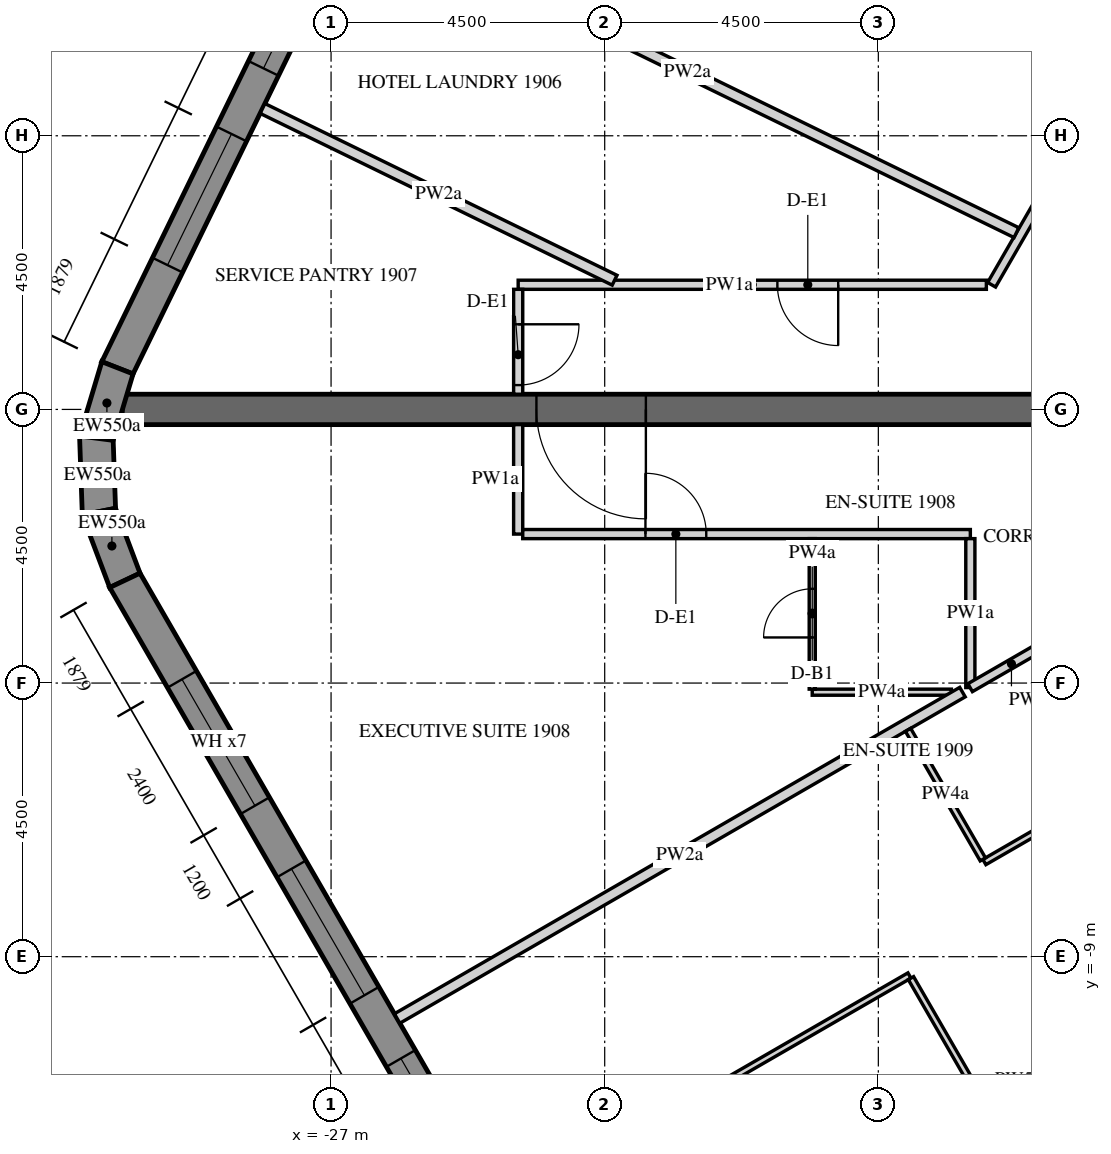
"""IFC4 building model, lengths in metres.
Left out: names, types, materials, properties, quantities, classifications, styles, units other than length and angle.
Written with IfcOpenShell. Run it as: python <this file> out.ifc"""

import sys

from ifc_helpers import new_model, si_unit, direction, frame, frame_2d, origin, place, context, subcontext, project, spatial, polyline, rectangle, outline, extrude, element, fill, save


model = new_model("IFC4")
c1 = context("Model", 3, precision=1e-05, world=origin(), true_north=direction((0.0, 1.0)))
c2 = subcontext(c1, "Body", "Model", "MODEL_VIEW")
j1 = project(units=[si_unit("LENGTHUNIT", "METRE"), si_unit("PLANEANGLEUNIT", "RADIAN")], contexts=[c1])
p1 = place(None, origin())
s1 = spatial("IfcSite", under=j1, at=p1, CompositionType="ELEMENT")
p2 = place(p1, origin())
s2 = spatial("IfcBuilding", under=s1, at=p2, CompositionType="ELEMENT")
p3 = place(p2, frame((0.0, 0.0, 246.3)))
s3 = spatial("IfcBuildingStorey", under=s2, at=p3, CompositionType="ELEMENT", Elevation=246.3)
p4 = place(p3, frame((-18.345, 25.633, -0.15), z_axis=(0.0, 0.0, 1.0), x_axis=(-0.43837181828, -0.898793718791, 0.0)))
e1 = element("IfcWall", 1, at=p4, inside=s3, PredefinedType="SOLIDWALL", context=c2, shape_type="SweptSolid", body=[
    extrude(outline(polyline([(-0.026, -0.275), (27.78, -0.275), (27.735, 0.275), (0.026, 0.275), (-0.026, -0.275)])), origin(), (0.0, 0.0, 1.0), 3.75),
])
p5 = place(p4, frame((1.879, 0.0, 1.05)))
e2 = element("IfcOpeningElement", 2, at=p5, cuts=e1, PredefinedType="OPENING", context=c2, shape_type="SweptSolid", body=[
    extrude(rectangle(XDim=2.4, YDim=2.4, at=frame_2d((1.2, 1.2))), frame((0.0, 0.285, 0.0), z_axis=(0.0, -1.0, 0.0), x_axis=(1.0, 0.0, 0.0)), (0.0, 0.0, 1.0), 0.57),
])
p6 = place(p4, frame((5.479, 0.0, 1.05)))
e3 = element("IfcOpeningElement", 3, at=p6, cuts=e1, PredefinedType="OPENING", context=c2, shape_type="SweptSolid", body=[
    extrude(rectangle(XDim=2.4, YDim=2.4, at=frame_2d((1.2, 1.2))), frame((0.0, 0.285, 0.0), z_axis=(0.0, -1.0, 0.0), x_axis=(1.0, 0.0, 0.0)), (0.0, 0.0, 1.0), 0.57),
])
p7 = place(p4, frame((9.079, 0.0, 1.05)))
e4 = element("IfcOpeningElement", 4, at=p7, cuts=e1, PredefinedType="OPENING", context=c2, shape_type="SweptSolid", body=[
    extrude(rectangle(XDim=2.4, YDim=2.4, at=frame_2d((1.2, 1.2))), frame((0.0, 0.285, 0.0), z_axis=(0.0, -1.0, 0.0), x_axis=(1.0, 0.0, 0.0)), (0.0, 0.0, 1.0), 0.57),
])
p8 = place(p4, frame((12.679, 0.0, 1.05)))
e5 = element("IfcOpeningElement", 5, at=p8, cuts=e1, PredefinedType="OPENING", context=c2, shape_type="SweptSolid", body=[
    extrude(rectangle(XDim=2.4, YDim=2.4, at=frame_2d((1.2, 1.2))), frame((0.0, 0.285, 0.0), z_axis=(0.0, -1.0, 0.0), x_axis=(1.0, 0.0, 0.0)), (0.0, 0.0, 1.0), 0.57),
])
p9 = place(p4, frame((16.279, 0.0, 1.05)))
e6 = element("IfcOpeningElement", 6, at=p9, cuts=e1, PredefinedType="OPENING", context=c2, shape_type="SweptSolid", body=[
    extrude(rectangle(XDim=2.4, YDim=2.4, at=frame_2d((1.2, 1.2))), frame((0.0, 0.285, 0.0), z_axis=(0.0, -1.0, 0.0), x_axis=(1.0, 0.0, 0.0)), (0.0, 0.0, 1.0), 0.57),
])
p10 = place(p4, frame((19.879, 0.0, 1.05)))
e7 = element("IfcOpeningElement", 7, at=p10, cuts=e1, PredefinedType="OPENING", context=c2, shape_type="SweptSolid", body=[
    extrude(rectangle(XDim=2.4, YDim=2.4, at=frame_2d((1.2, 1.2))), frame((0.0, 0.285, 0.0), z_axis=(0.0, -1.0, 0.0), x_axis=(1.0, 0.0, 0.0)), (0.0, 0.0, 1.0), 0.57),
])
p11 = place(p4, frame((23.479, 0.0, 1.05)))
e8 = element("IfcOpeningElement", 8, at=p11, cuts=e1, PredefinedType="OPENING", context=c2, shape_type="SweptSolid", body=[
    extrude(rectangle(XDim=2.4, YDim=2.4, at=frame_2d((1.2, 1.2))), frame((0.0, 0.285, 0.0), z_axis=(0.0, -1.0, 0.0), x_axis=(1.0, 0.0, 0.0)), (0.0, 0.0, 1.0), 0.57),
])
p12 = place(p3, frame((-30.513, 0.684, -0.15), z_axis=(0.0, 0.0, 1.0), x_axis=(-0.286736058109, -0.958009620505, 0.0)))
e9 = element("IfcWall", 9, at=p12, inside=s3, PredefinedType="SOLIDWALL", context=c2, shape_type="SweptSolid", body=[
    extrude(outline(polyline([(-0.022, -0.275), (1.253, -0.275), (1.163, 0.275), (0.022, 0.275), (-0.022, -0.275)])), origin(), (0.0, 0.0, 1.0), 3.75),
])
p13 = place(p3, frame((-30.86, -0.473, -0.15), z_axis=(0.0, 0.0, 1.0), x_axis=(0.03495638276, -0.999388838893, 0.0)))
e10 = element("IfcWall", 10, at=p13, inside=s3, PredefinedType="SOLIDWALL", context=c2, shape_type="SweptSolid", body=[
    extrude(outline(polyline([(-0.045, -0.275), (1.253, -0.275), (1.163, 0.275), (0.045, 0.275), (-0.045, -0.275)])), origin(), (0.0, 0.0, 1.0), 3.75),
])
p14 = place(p3, frame((-30.817, -1.681, -0.15), z_axis=(0.0, 0.0, 1.0), x_axis=(0.352850303963, -0.935679786569, 0.0)))
e11 = element("IfcWall", 11, at=p14, inside=s3, PredefinedType="SOLIDWALL", context=c2, shape_type="SweptSolid", body=[
    extrude(outline(polyline([(-0.045, -0.275), (1.23, -0.275), (1.186, 0.275), (0.045, 0.275), (-0.045, -0.275)])), origin(), (0.0, 0.0, 1.0), 3.75),
])
p15 = place(p3, frame((-30.391, -2.811, -0.15), z_axis=(0.0, 0.0, 1.0), x_axis=(0.499998569178, -0.866026229868, 0.0)))
e12 = element("IfcWall", 12, at=p15, inside=s3, PredefinedType="SOLIDWALL", context=c2, shape_type="SweptSolid", body=[
    extrude(outline(polyline([(-0.022, -0.275), (27.783, -0.275), (27.732, 0.275), (0.022, 0.275), (-0.022, -0.275)])), origin(), (0.0, 0.0, 1.0), 3.75),
])
p16 = place(p15, frame((1.879, 0.0, 1.05)))
e13 = element("IfcOpeningElement", 13, at=p16, cuts=e12, PredefinedType="OPENING", context=c2, shape_type="SweptSolid", body=[
    extrude(rectangle(XDim=2.4, YDim=2.4, at=frame_2d((1.2, 1.2))), frame((0.0, 0.285, 0.0), z_axis=(0.0, -1.0, 0.0), x_axis=(1.0, 0.0, 0.0)), (0.0, 0.0, 1.0), 0.57),
])
p17 = place(p15, frame((5.479, 0.0, 1.05)))
e14 = element("IfcOpeningElement", 14, at=p17, cuts=e12, PredefinedType="OPENING", context=c2, shape_type="SweptSolid", body=[
    extrude(rectangle(XDim=2.4, YDim=2.4, at=frame_2d((1.2, 1.2))), frame((0.0, 0.285, 0.0), z_axis=(0.0, -1.0, 0.0), x_axis=(1.0, 0.0, 0.0)), (0.0, 0.0, 1.0), 0.57),
])
p18 = place(p15, frame((9.079, 0.0, 1.05)))
e15 = element("IfcOpeningElement", 15, at=p18, cuts=e12, PredefinedType="OPENING", context=c2, shape_type="SweptSolid", body=[
    extrude(rectangle(XDim=2.4, YDim=2.4, at=frame_2d((1.2, 1.2))), frame((0.0, 0.285, 0.0), z_axis=(0.0, -1.0, 0.0), x_axis=(1.0, 0.0, 0.0)), (0.0, 0.0, 1.0), 0.57),
])
p19 = place(p15, frame((12.679, 0.0, 1.05)))
e16 = element("IfcOpeningElement", 16, at=p19, cuts=e12, PredefinedType="OPENING", context=c2, shape_type="SweptSolid", body=[
    extrude(rectangle(XDim=2.4, YDim=2.4, at=frame_2d((1.2, 1.2))), frame((0.0, 0.285, 0.0), z_axis=(0.0, -1.0, 0.0), x_axis=(1.0, 0.0, 0.0)), (0.0, 0.0, 1.0), 0.57),
])
p20 = place(p15, frame((16.279, 0.0, 1.05)))
e17 = element("IfcOpeningElement", 17, at=p20, cuts=e12, PredefinedType="OPENING", context=c2, shape_type="SweptSolid", body=[
    extrude(rectangle(XDim=2.4, YDim=2.4, at=frame_2d((1.2, 1.2))), frame((0.0, 0.285, 0.0), z_axis=(0.0, -1.0, 0.0), x_axis=(1.0, 0.0, 0.0)), (0.0, 0.0, 1.0), 0.57),
])
p21 = place(p15, frame((19.879, 0.0, 1.05)))
e18 = element("IfcOpeningElement", 18, at=p21, cuts=e12, PredefinedType="OPENING", context=c2, shape_type="SweptSolid", body=[
    extrude(rectangle(XDim=2.4, YDim=2.4, at=frame_2d((1.2, 1.2))), frame((0.0, 0.285, 0.0), z_axis=(0.0, -1.0, 0.0), x_axis=(1.0, 0.0, 0.0)), (0.0, 0.0, 1.0), 0.57),
])
p22 = place(p15, frame((23.479, 0.0, 1.05)))
e19 = element("IfcOpeningElement", 19, at=p22, cuts=e12, PredefinedType="OPENING", context=c2, shape_type="SweptSolid", body=[
    extrude(rectangle(XDim=2.4, YDim=2.4, at=frame_2d((1.2, 1.2))), frame((0.0, 0.285, 0.0), z_axis=(0.0, -1.0, 0.0), x_axis=(1.0, 0.0, 0.0)), (0.0, 0.0, 1.0), 0.57),
])
p23 = place(p3, frame((-15.011, 0.0, -0.15), z_axis=(0.0, 0.0, 1.0), x_axis=(-1.0, 0.0, 0.0)))
e20 = element("IfcWall", 20, at=p23, inside=s3, PredefinedType="SHEAR", context=c2, shape_type="SweptSolid", body=[
    extrude(rectangle(XDim=15.424, YDim=0.5, at=frame_2d((7.712, 0.0))), origin(), (0.0, 0.0, 1.0), 3.75),
])
p24 = place(p23, frame((6.812, 0.0, 0.15)))
e21 = element("IfcOpeningElement", 21, at=p24, cuts=e20, PredefinedType="OPENING", context=c2, shape_type="SweptSolid", body=[
    extrude(rectangle(XDim=1.8, YDim=2.4, at=frame_2d((0.9, 1.2))), frame((0.0, 0.26, 0.0), z_axis=(0.0, -1.0, 0.0), x_axis=(1.0, 0.0, 0.0)), (0.0, 0.0, 1.0), 0.52),
])
p25 = place(p3, frame((-8.673, 14.978, 0.0), z_axis=(0.0, 0.0, 1.0), x_axis=(-0.50000700621, -0.86602135871, 0.0)))
e22 = element("IfcWall", 22, at=p25, inside=s3, PredefinedType="PARTITIONING", context=c2, shape_type="SweptSolid", body=[
    extrude(rectangle(XDim=14.928, YDim=0.15, at=frame_2d((7.464, 0.0))), origin(), (0.0, 0.0, 1.0), 2.838),
])
p26 = place(p25, frame((4.454, 0.0, 0.0)))
e23 = element("IfcOpeningElement", 23, at=p26, cuts=e22, PredefinedType="OPENING", context=c2, shape_type="SweptSolid", body=[
    extrude(rectangle(XDim=1.0, YDim=2.1, at=frame_2d((0.5, 1.05))), frame((0.0, 0.085, 0.0), z_axis=(0.0, -1.0, 0.0), x_axis=(1.0, 0.0, 0.0)), (0.0, 0.0, 1.0), 0.17),
])
p27 = place(p25, frame((11.264, 0.0, 0.0)))
e24 = element("IfcOpeningElement", 24, at=p27, cuts=e22, PredefinedType="OPENING", context=c2, shape_type="SweptSolid", body=[
    extrude(rectangle(XDim=1.0, YDim=2.1, at=frame_2d((0.5, 1.05))), frame((0.0, 0.085, 0.0), z_axis=(0.0, -1.0, 0.0), x_axis=(1.0, 0.0, 0.0)), (0.0, 0.0, 1.0), 0.17),
])
p28 = place(p3, frame((-16.224, 2.05, 0.0), z_axis=(0.0, 0.0, 1.0), x_axis=(-1.0, 0.0, 0.0)))
e25 = element("IfcWall", 25, at=p28, inside=s3, PredefinedType="PARTITIONING", context=c2, shape_type="SweptSolid", body=[
    extrude(rectangle(XDim=7.699, YDim=0.15, at=frame_2d((3.85, 0.0))), origin(), (0.0, 0.0, 1.0), 2.838),
])
p29 = place(p28, frame((2.437, 0.0, 0.0)))
e26 = element("IfcOpeningElement", 26, at=p29, cuts=e25, PredefinedType="OPENING", context=c2, shape_type="SweptSolid", body=[
    extrude(rectangle(XDim=1.0, YDim=2.1, at=frame_2d((0.5, 1.05))), frame((0.0, 0.085, 0.0), z_axis=(0.0, -1.0, 0.0), x_axis=(1.0, 0.0, 0.0)), (0.0, 0.0, 1.0), 0.17),
])
p30 = place(p3, frame((-23.923, 1.975, 0.0), z_axis=(0.0, 0.0, 1.0), x_axis=(0.0, -1.0, 0.0)))
e27 = element("IfcWall", 27, at=p30, inside=s3, PredefinedType="PARTITIONING", context=c2, shape_type="SweptSolid", body=[
    extrude(rectangle(XDim=1.725, YDim=0.15, at=frame_2d((0.863, 0.0))), origin(), (0.0, 0.0, 1.0), 2.838),
])
p31 = place(p30, frame((0.575, 0.0, 0.0)))
e28 = element("IfcOpeningElement", 28, at=p31, cuts=e27, PredefinedType="OPENING", context=c2, shape_type="SweptSolid", body=[
    extrude(rectangle(XDim=1.0, YDim=2.1, at=frame_2d((0.5, 1.05))), frame((0.0, 0.085, 0.0), z_axis=(0.0, -1.0, 0.0), x_axis=(1.0, 0.0, 0.0)), (0.0, 0.0, 1.0), 0.17),
])
p32 = place(p3, frame((-23.923, -0.25, 0.0), z_axis=(0.0, 0.0, 1.0), x_axis=(0.0, -1.0, 0.0)))
e29 = element("IfcWall", 29, at=p32, inside=s3, PredefinedType="PARTITIONING", context=c2, shape_type="SweptSolid", body=[
    extrude(rectangle(XDim=1.8, YDim=0.15, at=frame_2d((0.9, 0.0))), origin(), (0.0, 0.0, 1.0), 2.838),
])
p33 = place(p3, frame((-23.848, -2.05, 0.0), z_axis=(0.0, 0.0, 1.0), x_axis=(1.0, 0.0, 0.0)))
e30 = element("IfcWall", 30, at=p33, inside=s3, PredefinedType="PARTITIONING", context=c2, shape_type="SweptSolid", body=[
    extrude(rectangle(XDim=7.361, YDim=0.15, at=frame_2d((3.68, 0.0))), origin(), (0.0, 0.0, 1.0), 2.838),
])
p34 = place(p33, frame((2.018, 0.0, 0.0)))
e31 = element("IfcOpeningElement", 31, at=p34, cuts=e30, PredefinedType="OPENING", context=c2, shape_type="SweptSolid", body=[
    extrude(rectangle(XDim=1.0, YDim=2.1, at=frame_2d((0.5, 1.05))), frame((0.0, 0.085, 0.0), z_axis=(0.0, -1.0, 0.0), x_axis=(1.0, 0.0, 0.0)), (0.0, 0.0, 1.0), 0.17),
])
p35 = place(p3, frame((-16.487, -2.125, 0.0), z_axis=(0.0, 0.0, 1.0), x_axis=(0.0, -1.0, 0.0)))
e32 = element("IfcWall", 32, at=p35, inside=s3, PredefinedType="PARTITIONING", context=c2, shape_type="SweptSolid", body=[
    extrude(rectangle(XDim=2.449, YDim=0.15, at=frame_2d((1.225, 0.0))), origin(), (0.0, 0.0, 1.0), 2.838),
])
p36 = place(p3, frame((-16.49, -4.576, 0.0), z_axis=(0.0, 0.0, 1.0), x_axis=(0.865993845424, 0.5000546567, 0.0)))
e33 = element("IfcWall", 33, at=p36, inside=s3, PredefinedType="PARTITIONING", context=c2, shape_type="SweptSolid", body=[
    extrude(rectangle(XDim=1.569, YDim=0.15, at=frame_2d((0.785, 0.0))), origin(), (0.0, 0.0, 1.0), 2.838),
])
p37 = place(p3, frame((-26.549, 8.185, 0.0), z_axis=(0.0, 0.0, 1.0), x_axis=(0.8987965099, -0.438366095623, 0.0)))
e34 = element("IfcWall", 34, at=p37, inside=s3, PredefinedType="PARTITIONING", context=c2, shape_type="SweptSolid", body=[
    extrude(rectangle(XDim=12.039, YDim=0.18, at=frame_2d((6.019, 0.0))), origin(), (0.0, 0.0, 1.0), 2.838),
])
p38 = place(p3, frame((-28.127, 4.949, 0.0), z_axis=(0.0, 0.0, 1.0), x_axis=(0.898795032868, -0.438369124017, 0.0)))
e35 = element("IfcWall", 35, at=p38, inside=s3, PredefinedType="PARTITIONING", context=c2, shape_type="SweptSolid", body=[
    extrude(rectangle(XDim=6.442, YDim=0.18, at=frame_2d((3.221, 0.0))), origin(), (0.0, 0.0, 1.0), 2.838),
])
p39 = place(p3, frame((-16.798, -4.65, 0.0), z_axis=(0.0, 0.0, 1.0), x_axis=(-1.0, 0.0, 0.0)))
e36 = element("IfcWall", 36, at=p39, inside=s3, PredefinedType="PARTITIONING", context=c2, shape_type="SweptSolid", body=[
    extrude(rectangle(XDim=2.289, YDim=0.1, at=frame_2d((1.144, 0.0))), origin(), (0.0, 0.0, 1.0), 2.838),
])
p40 = place(p3, frame((-19.087, -4.6, 0.0), z_axis=(0.0, 0.0, 1.0), x_axis=(0.0, 1.0, 0.0)))
e37 = element("IfcWall", 37, at=p40, inside=s3, PredefinedType="PARTITIONING", context=c2, shape_type="SweptSolid", body=[
    extrude(rectangle(XDim=2.475, YDim=0.1, at=frame_2d((1.238, 0.0))), origin(), (0.0, 0.0, 1.0), 2.838),
])
p41 = place(p40, frame((0.85, 0.0, 0.0)))
e38 = element("IfcOpeningElement", 38, at=p41, cuts=e37, PredefinedType="OPENING", context=c2, shape_type="SweptSolid", body=[
    extrude(rectangle(XDim=0.8, YDim=2.1, at=frame_2d((0.4, 1.05))), frame((0.0, 0.06, 0.0), z_axis=(0.0, -1.0, 0.0), x_axis=(1.0, 0.0, 0.0)), (0.0, 0.0, 1.0), 0.12),
])
p42 = place(p3, frame((-25.914, -10.017, 0.0), z_axis=(0.0, 0.0, 1.0), x_axis=(0.86602614826, 0.499998710529, 0.0)))
e39 = element("IfcWall", 39, at=p42, inside=s3, PredefinedType="PARTITIONING", context=c2, shape_type="SweptSolid", body=[
    extrude(rectangle(XDim=10.735, YDim=0.18, at=frame_2d((5.368, 0.0))), origin(), (0.0, 0.0, 1.0), 2.838),
])
p43 = place(p3, frame((-13.896, -6.081, 0.0), z_axis=(0.0, 0.0, 1.0), x_axis=(-0.866012511928, -0.500022328685, 0.0)))
e40 = element("IfcWall", 40, at=p43, inside=s3, PredefinedType="PARTITIONING", context=c2, shape_type="SweptSolid", body=[
    extrude(rectangle(XDim=2.725, YDim=0.1, at=frame_2d((1.363, 0.0))), origin(), (0.0, 0.0, 1.0), 2.838),
])
p44 = place(p43, frame((0.925, 0.0, 0.0)))
e41 = element("IfcOpeningElement", 41, at=p44, cuts=e40, PredefinedType="OPENING", context=c2, shape_type="SweptSolid", body=[
    extrude(rectangle(XDim=0.8, YDim=2.1, at=frame_2d((0.4, 1.05))), frame((0.0, 0.06, 0.0), z_axis=(0.0, -1.0, 0.0), x_axis=(1.0, 0.0, 0.0)), (0.0, 0.0, 1.0), 0.12),
])
p45 = place(p3, frame((-16.281, -7.4, 0.0), z_axis=(0.0, 0.0, 1.0), x_axis=(-0.500003092839, 0.866023618125, 0.0)))
e42 = element("IfcWall", 42, at=p45, inside=s3, PredefinedType="PARTITIONING", context=c2, shape_type="SweptSolid", body=[
    extrude(rectangle(XDim=2.46, YDim=0.1, at=frame_2d((1.23, 0.0))), origin(), (0.0, 0.0, 1.0), 2.838),
])
p46 = place(p3, frame((-24.114, -13.134, 0.0), z_axis=(0.0, 0.0, 1.0), x_axis=(0.866033062874, 0.499986733834, 0.0)))
e43 = element("IfcWall", 43, at=p46, inside=s3, PredefinedType="PARTITIONING", context=c2, shape_type="SweptSolid", body=[
    extrude(rectangle(XDim=7.65, YDim=0.1, at=frame_2d((3.825, 0.0))), origin(), (0.0, 0.0, 1.0), 2.838),
])
p47 = place(p3, frame((-17.463, -9.353, 0.0), z_axis=(0.0, 0.0, 1.0), x_axis=(0.499995846692, -0.866027801685, 0.0)))
e44 = element("IfcWall", 44, at=p47, inside=s3, PredefinedType="PARTITIONING", context=c2, shape_type="SweptSolid", body=[
    extrude(rectangle(XDim=7.06, YDim=0.1, at=frame_2d((3.53, 0.0))), origin(), (0.0, 0.0, 1.0), 2.838),
])
p48 = place(p47, frame((3.1, 0.0, 0.0)))
e45 = element("IfcOpeningElement", 45, at=p48, cuts=e44, PredefinedType="OPENING", context=c2, shape_type="SweptSolid", body=[
    extrude(rectangle(XDim=0.9, YDim=2.1, at=frame_2d((0.45, 1.05))), frame((0.0, 0.06, 0.0), z_axis=(0.0, -1.0, 0.0), x_axis=(1.0, 0.0, 0.0)), (0.0, 0.0, 1.0), 0.12),
])
p49 = place(p10, frame((0.0, 0.205, 0.0)))
e46 = element("IfcWindow", 46, at=p49, inside=s3, PartitioningType="DOUBLE_PANEL_VERTICAL", PredefinedType="WINDOW", context=c2, shape_type="SweptSolid", body=[
    extrude(rectangle(XDim=2.4, YDim=2.4, at=frame_2d((1.2, 1.2))), frame((0.0, 0.03, 0.0), z_axis=(0.0, -1.0, 0.0), x_axis=(1.0, 0.0, 0.0)), (0.0, 0.0, 1.0), 0.06),
])
fill(e7, e46)
p50 = place(p11, frame((0.0, 0.205, 0.0)))
e47 = element("IfcWindow", 47, at=p50, inside=s3, PartitioningType="DOUBLE_PANEL_VERTICAL", PredefinedType="WINDOW", context=c2, shape_type="SweptSolid", body=[
    extrude(rectangle(XDim=2.4, YDim=2.4, at=frame_2d((1.2, 1.2))), frame((0.0, 0.03, 0.0), z_axis=(0.0, -1.0, 0.0), x_axis=(1.0, 0.0, 0.0)), (0.0, 0.0, 1.0), 0.06),
])
fill(e8, e47)
p51 = place(p16, frame((0.0, 0.205, 0.0)))
e48 = element("IfcWindow", 48, at=p51, inside=s3, PartitioningType="DOUBLE_PANEL_VERTICAL", PredefinedType="WINDOW", context=c2, shape_type="SweptSolid", body=[
    extrude(rectangle(XDim=2.4, YDim=2.4, at=frame_2d((1.2, 1.2))), frame((0.0, 0.03, 0.0), z_axis=(0.0, -1.0, 0.0), x_axis=(1.0, 0.0, 0.0)), (0.0, 0.0, 1.0), 0.06),
])
fill(e13, e48)
p52 = place(p17, frame((0.0, 0.205, 0.0)))
e49 = element("IfcWindow", 49, at=p52, inside=s3, PartitioningType="DOUBLE_PANEL_VERTICAL", PredefinedType="WINDOW", context=c2, shape_type="SweptSolid", body=[
    extrude(rectangle(XDim=2.4, YDim=2.4, at=frame_2d((1.2, 1.2))), frame((0.0, 0.03, 0.0), z_axis=(0.0, -1.0, 0.0), x_axis=(1.0, 0.0, 0.0)), (0.0, 0.0, 1.0), 0.06),
])
fill(e14, e49)
p53 = place(p18, frame((0.0, 0.205, 0.0)))
e50 = element("IfcWindow", 50, at=p53, inside=s3, PartitioningType="DOUBLE_PANEL_VERTICAL", PredefinedType="WINDOW", context=c2, shape_type="SweptSolid", body=[
    extrude(rectangle(XDim=2.4, YDim=2.4, at=frame_2d((1.2, 1.2))), frame((0.0, 0.03, 0.0), z_axis=(0.0, -1.0, 0.0), x_axis=(1.0, 0.0, 0.0)), (0.0, 0.0, 1.0), 0.06),
])
fill(e15, e50)
p54 = place(p24, origin())
e51 = element("IfcDoor", 51, at=p54, inside=s3, OperationType="DOUBLE_DOOR_SINGLE_SWING", PredefinedType="DOOR", context=c2, shape_type="SweptSolid", body=[
    extrude(rectangle(XDim=1.8, YDim=2.4, at=frame_2d((0.9, 1.2))), frame((0.0, 0.025, 0.0), z_axis=(0.0, -1.0, 0.0), x_axis=(1.0, 0.0, 0.0)), (0.0, 0.0, 1.0), 0.05),
])
fill(e21, e51)
p55 = place(p29, origin())
e52 = element("IfcDoor", 52, at=p55, inside=s3, OperationType="SINGLE_SWING_RIGHT", PredefinedType="DOOR", context=c2, shape_type="SweptSolid", body=[
    extrude(rectangle(XDim=1.0, YDim=2.1, at=frame_2d((0.5, 1.05))), frame((0.0, 0.025, 0.0), z_axis=(0.0, -1.0, 0.0), x_axis=(1.0, 0.0, 0.0)), (0.0, 0.0, 1.0), 0.05),
])
fill(e26, e52)
p56 = place(p31, origin())
e53 = element("IfcDoor", 53, at=p56, inside=s3, OperationType="SINGLE_SWING_LEFT", PredefinedType="DOOR", context=c2, shape_type="SweptSolid", body=[
    extrude(rectangle(XDim=1.0, YDim=2.1, at=frame_2d((0.5, 1.05))), frame((0.0, 0.025, 0.0), z_axis=(0.0, -1.0, 0.0), x_axis=(1.0, 0.0, 0.0)), (0.0, 0.0, 1.0), 0.05),
])
fill(e28, e53)
p57 = place(p34, origin())
e54 = element("IfcDoor", 54, at=p57, inside=s3, OperationType="SINGLE_SWING_LEFT", PredefinedType="DOOR", context=c2, shape_type="SweptSolid", body=[
    extrude(rectangle(XDim=1.0, YDim=2.1, at=frame_2d((0.5, 1.05))), frame((0.0, 0.025, 0.0), z_axis=(0.0, -1.0, 0.0), x_axis=(1.0, 0.0, 0.0)), (0.0, 0.0, 1.0), 0.05),
])
fill(e31, e54)
p58 = place(p41, origin())
e55 = element("IfcDoor", 55, at=p58, inside=s3, OperationType="SINGLE_SWING_RIGHT", PredefinedType="DOOR", context=c2, shape_type="SweptSolid", body=[
    extrude(rectangle(XDim=0.8, YDim=2.1, at=frame_2d((0.4, 1.05))), frame((0.0, 0.025, 0.0), z_axis=(0.0, -1.0, 0.0), x_axis=(1.0, 0.0, 0.0)), (0.0, 0.0, 1.0), 0.05),
])
fill(e38, e55)
save(model, sys.argv[1])
